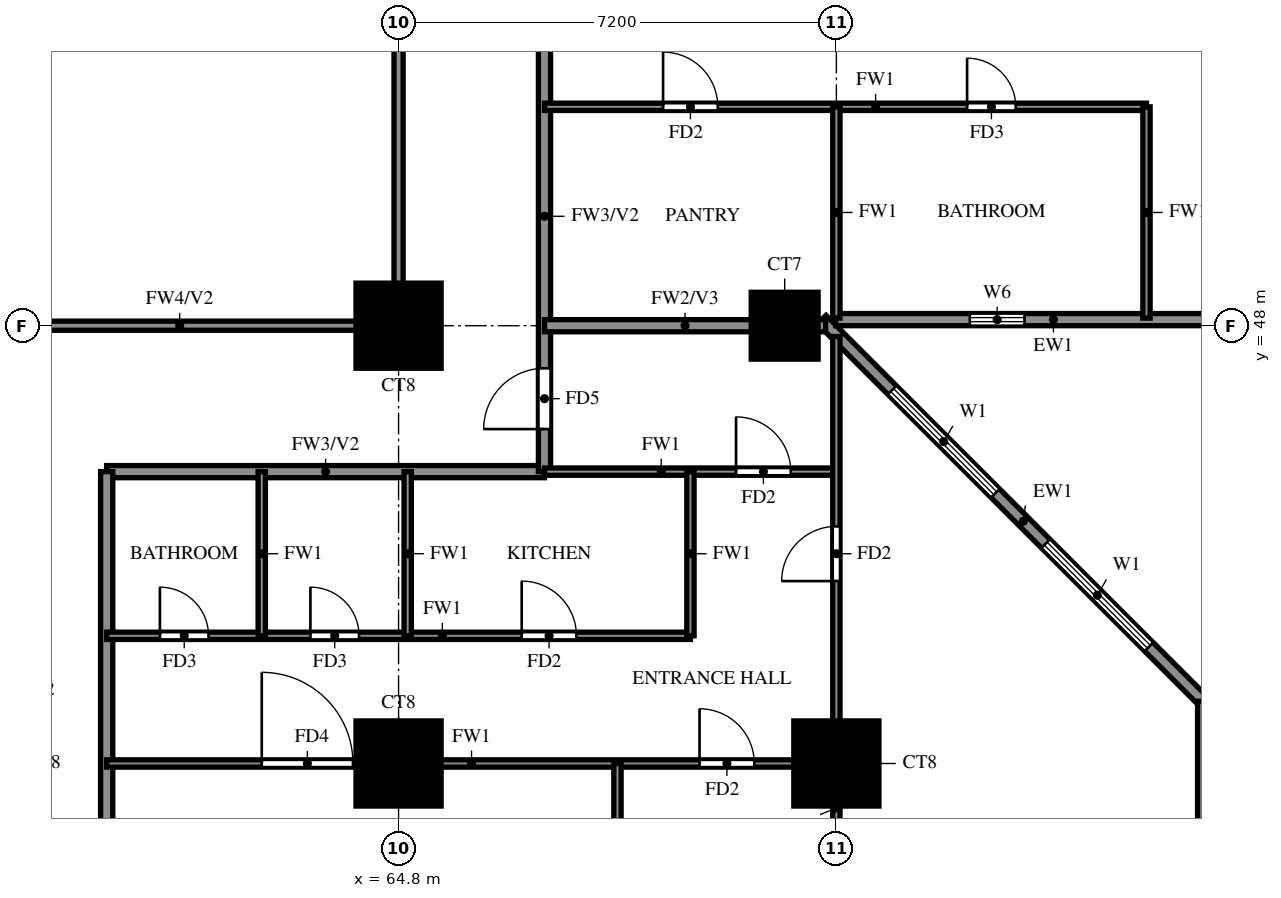
"""IFC4 building model, lengths in metres.
Left out: names, types, materials, properties, quantities, classifications, styles, units other than length and angle.
Written with IfcOpenShell. Run it as: python <this file> out.ifc"""

import sys

from ifc_helpers import new_model, si_unit, direction, frame, frame_2d, origin, origin_2d, place, context, subcontext, project, spatial, rectangle, extrude, source, transform, mapped, element, fill, save


model = new_model("IFC4")
c1 = context("Model", 3, precision=1e-05, world=origin(), true_north=direction((0.0, 1.0)))
c2 = subcontext(c1, "Body", "Model", "MODEL_VIEW")
j1 = project(units=[si_unit("LENGTHUNIT", "METRE"), si_unit("PLANEANGLEUNIT", "RADIAN")], contexts=[c1])
p1 = place(None, origin())
s1 = spatial("IfcSite", under=j1, at=p1, CompositionType="ELEMENT")
p2 = place(p1, origin())
s2 = spatial("IfcBuilding", under=s1, at=p2, CompositionType="ELEMENT")
p3 = place(p2, frame((0.0, 0.0, 58.5)))
s3 = spatial("IfcBuildingStorey", under=s2, at=p3, CompositionType="ELEMENT", Elevation=58.5)
m1 = source(origin(), c2, "Body", "SweptSolid", [
    extrude(rectangle(XDim=1.4, YDim=1.4, at=origin_2d()), origin(), (0.0, 0.0, 1.0), 3.18),
])
for number, where, z_axis, x_axis in (
    (1, (64.8, 40.8, 0.0), (0.0, 0.0, 1.0), (1.0, 0.0, 0.0)),
    (2, (72.0, 40.8, 0.0), (0.0, 0.0, 1.0), (1.0, 0.0, 0.0)),
    (3, (64.8, 48.0, 0.0), (0.0, 0.0, 1.0), (1.0, 0.0, 0.0)),
):
    element("IfcColumn", number, at=place(p3, frame(where, z_axis=z_axis, x_axis=x_axis)), inside=s3, PredefinedType="COLUMN", context=c2, shape_type="MappedRepresentation", body=[
        mapped(m1, transform((0.0, 0.0, 0.0))),
    ])
m2 = source(origin(), c2, "Body", "SweptSolid", [
    extrude(rectangle(XDim=1.1, YDim=1.1, at=origin_2d()), origin(), (0.0, 0.0, 1.0), 3.18),
])
p4 = place(p3, frame((71.15, 48.0, 0.0), z_axis=(0.0, 0.0, 1.0), x_axis=(1.0, 0.0, 0.0)))
e4 = element("IfcColumn", 4, at=p4, inside=s3, PredefinedType="COLUMN", context=c2, shape_type="MappedRepresentation", body=[
    mapped(m2, transform((0.0, 0.0, 0.0))),
])
p5 = place(p3, frame((78.74, 41.118, 0.0), z_axis=(0.0, 0.0, 1.0), x_axis=(-0.707106781187, 0.707106781187, 0.0)))
e5 = element("IfcWall", 5, at=p5, inside=s3, PredefinedType="SOLIDWALL", context=c2, shape_type="SweptSolid", body=[
    extrude(rectangle(XDim=9.874, YDim=0.2, at=frame_2d((4.937, 0.0))), origin(), (0.0, 0.0, 1.0), 3.18),
])
p6 = place(p5, frame((2.264, 0.0, 0.6)))
e6 = element("IfcOpeningElement", 6, at=p6, cuts=e5, PredefinedType="OPENING", context=c2, shape_type="SweptSolid", body=[
    extrude(rectangle(XDim=2.4, YDim=2.4, at=frame_2d((1.2, 1.2))), frame((0.0, 0.11, 0.0), z_axis=(0.0, -1.0, 0.0), x_axis=(1.0, 0.0, 0.0)), (0.0, 0.0, 1.0), 0.22),
])
p7 = place(p5, frame((5.836, 0.0, 0.6)))
e7 = element("IfcOpeningElement", 7, at=p7, cuts=e5, PredefinedType="OPENING", context=c2, shape_type="SweptSolid", body=[
    extrude(rectangle(XDim=2.4, YDim=2.4, at=frame_2d((1.2, 1.2))), frame((0.0, 0.11, 0.0), z_axis=(0.0, -1.0, 0.0), x_axis=(1.0, 0.0, 0.0)), (0.0, 0.0, 1.0), 0.22),
])
p8 = place(p3, frame((71.989, 48.1, 0.0), z_axis=(0.0, 0.0, 1.0), x_axis=(1.0, 0.0, 0.0)))
e8 = element("IfcWall", 8, at=p8, inside=s3, PredefinedType="SOLIDWALL", context=c2, shape_type="SweptSolid", body=[
    extrude(rectangle(XDim=6.511, YDim=0.2, at=frame_2d((3.256, 0.0))), origin(), (0.0, 0.0, 1.0), 3.18),
])
p9 = place(p8, frame((2.206, 0.0, 1.5)))
e9 = element("IfcOpeningElement", 9, at=p9, cuts=e8, PredefinedType="OPENING", context=c2, shape_type="SweptSolid", body=[
    extrude(rectangle(XDim=0.9, YDim=0.9, at=frame_2d((0.45, 0.45))), frame((0.0, 0.11, 0.0), z_axis=(0.0, -1.0, 0.0), x_axis=(1.0, 0.0, 0.0)), (0.0, 0.0, 1.0), 0.22),
])
p10 = place(p3, frame((60.0, 45.6, 0.0), z_axis=(0.0, 0.0, 1.0), x_axis=(1.0, 0.0, 0.0)))
e10 = element("IfcWall", 10, at=p10, inside=s3, PredefinedType="SOLIDWALL", context=c2, shape_type="SweptSolid", body=[
    extrude(rectangle(XDim=7.2, YDim=0.2, at=frame_2d((3.6, 0.0))), origin(), (0.0, 0.0, 1.0), 3.18),
])
p11 = place(p3, frame((60.0, 33.725, 0.0), z_axis=(0.0, 0.0, 1.0), x_axis=(0.0, 1.0, 0.0)))
e11 = element("IfcWall", 11, at=p11, inside=s3, PredefinedType="SOLIDWALL", context=c2, shape_type="SweptSolid", body=[
    extrude(rectangle(XDim=11.875, YDim=0.2, at=frame_2d((5.938, 0.0))), origin(), (0.0, 0.0, 1.0), 2.28),
])
p12 = place(p3, frame((67.2, 45.6, 0.0), z_axis=(0.0, 0.0, 1.0), x_axis=(0.0, 1.0, 0.0)))
e12 = element("IfcWall", 12, at=p12, inside=s3, PredefinedType="SOLIDWALL", context=c2, shape_type="SweptSolid", body=[
    extrude(rectangle(XDim=8.4, YDim=0.2, at=frame_2d((4.2, 0.0))), origin(), (0.0, 0.0, 1.0), 3.18),
])
p13 = place(p12, frame((0.7, 0.0, 0.0)))
e13 = element("IfcOpeningElement", 13, at=p13, cuts=e12, PredefinedType="OPENING", context=c2, shape_type="SweptSolid", body=[
    extrude(rectangle(XDim=1.0, YDim=2.1, at=frame_2d((0.5, 1.05))), frame((0.0, 0.11, 0.0), z_axis=(0.0, -1.0, 0.0), x_axis=(1.0, 0.0, 0.0)), (0.0, 0.0, 1.0), 0.22),
])
p14 = place(p3, frame((67.2, 48.0, 0.0), z_axis=(0.0, 0.0, 1.0), x_axis=(1.0, 0.0, 0.0)))
e14 = element("IfcWall", 14, at=p14, inside=s3, PredefinedType="SOLIDWALL", context=c2, shape_type="SweptSolid", body=[
    extrude(rectangle(XDim=4.623, YDim=0.2, at=frame_2d((2.312, 0.0))), origin(), (0.0, 0.0, 1.0), 3.18),
])
p15 = place(p3, frame((60.0, 40.8, 0.0), z_axis=(0.0, 0.0, 1.0), x_axis=(1.0, 0.0, 0.0)))
e15 = element("IfcWall", 15, at=p15, inside=s3, PredefinedType="PARTITIONING", context=c2, shape_type="SweptSolid", body=[
    extrude(rectangle(XDim=12.0, YDim=0.12, at=frame_2d((6.0, 0.0))), origin(), (0.0, 0.0, 1.0), 3.18),
])
p16 = place(p15, frame((9.75, 0.0, 0.0)))
e16 = element("IfcOpeningElement", 16, at=p16, cuts=e15, PredefinedType="OPENING", context=c2, shape_type="SweptSolid", body=[
    extrude(rectangle(XDim=0.9, YDim=2.1, at=frame_2d((0.45, 1.05))), frame((0.0, 0.07, 0.0), z_axis=(0.0, -1.0, 0.0), x_axis=(1.0, 0.0, 0.0)), (0.0, 0.0, 1.0), 0.14),
])
p17 = place(p15, frame((2.55, 0.0, 0.0)))
e17 = element("IfcOpeningElement", 17, at=p17, cuts=e15, PredefinedType="OPENING", context=c2, shape_type="SweptSolid", body=[
    extrude(rectangle(XDim=1.5, YDim=2.1, at=frame_2d((0.75, 1.05))), frame((0.0, 0.07, 0.0), z_axis=(0.0, -1.0, 0.0), x_axis=(1.0, 0.0, 0.0)), (0.0, 0.0, 1.0), 0.14),
])
p18 = place(p3, frame((60.0, 42.9, 0.0), z_axis=(0.0, 0.0, 1.0), x_axis=(1.0, 0.0, 0.0)))
e18 = element("IfcWall", 18, at=p18, inside=s3, PredefinedType="PARTITIONING", context=c2, shape_type="SweptSolid", body=[
    extrude(rectangle(XDim=9.6, YDim=0.12, at=frame_2d((4.8, 0.0))), origin(), (0.0, 0.0, 1.0), 3.18),
])
p19 = place(p18, frame((6.825, 0.0, 0.0)))
e19 = element("IfcOpeningElement", 19, at=p19, cuts=e18, PredefinedType="OPENING", context=c2, shape_type="SweptSolid", body=[
    extrude(rectangle(XDim=0.9, YDim=2.1, at=frame_2d((0.45, 1.05))), frame((0.0, 0.07, 0.0), z_axis=(0.0, -1.0, 0.0), x_axis=(1.0, 0.0, 0.0)), (0.0, 0.0, 1.0), 0.14),
])
p20 = place(p18, frame((3.35, 0.0, 0.0)))
e20 = element("IfcOpeningElement", 20, at=p20, cuts=e18, PredefinedType="OPENING", context=c2, shape_type="SweptSolid", body=[
    extrude(rectangle(XDim=0.8, YDim=2.1, at=frame_2d((0.4, 1.05))), frame((0.0, 0.07, 0.0), z_axis=(0.0, -1.0, 0.0), x_axis=(1.0, 0.0, 0.0)), (0.0, 0.0, 1.0), 0.14),
])
p21 = place(p18, frame((0.875, 0.0, 0.0)))
e21 = element("IfcOpeningElement", 21, at=p21, cuts=e18, PredefinedType="OPENING", context=c2, shape_type="SweptSolid", body=[
    extrude(rectangle(XDim=0.8, YDim=2.1, at=frame_2d((0.4, 1.05))), frame((0.0, 0.07, 0.0), z_axis=(0.0, -1.0, 0.0), x_axis=(1.0, 0.0, 0.0)), (0.0, 0.0, 1.0), 0.14),
])
p22 = place(p3, frame((67.2, 45.6, 0.0), z_axis=(0.0, 0.0, 1.0), x_axis=(1.0, 0.0, 0.0)))
e22 = element("IfcWall", 22, at=p22, inside=s3, PredefinedType="PARTITIONING", context=c2, shape_type="SweptSolid", body=[
    extrude(rectangle(XDim=4.8, YDim=0.12, at=frame_2d((2.4, 0.0))), origin(), (0.0, 0.0, 1.0), 3.18),
])
p23 = place(p22, frame((3.15, 0.0, 0.0)))
e23 = element("IfcOpeningElement", 23, at=p23, cuts=e22, PredefinedType="OPENING", context=c2, shape_type="SweptSolid", body=[
    extrude(rectangle(XDim=0.9, YDim=2.1, at=frame_2d((0.45, 1.05))), frame((0.0, 0.07, 0.0), z_axis=(0.0, -1.0, 0.0), x_axis=(1.0, 0.0, 0.0)), (0.0, 0.0, 1.0), 0.14),
])
p24 = place(p3, frame((67.2, 51.6, 0.0), z_axis=(0.0, 0.0, 1.0), x_axis=(1.0, 0.0, 0.0)))
e24 = element("IfcWall", 24, at=p24, inside=s3, PredefinedType="PARTITIONING", context=c2, shape_type="SweptSolid", body=[
    extrude(rectangle(XDim=9.9, YDim=0.12, at=frame_2d((4.95, 0.0))), origin(), (0.0, 0.0, 1.0), 3.18),
])
p25 = place(p24, frame((6.95, 0.0, 0.0)))
e25 = element("IfcOpeningElement", 25, at=p25, cuts=e24, PredefinedType="OPENING", context=c2, shape_type="SweptSolid", body=[
    extrude(rectangle(XDim=0.8, YDim=2.1, at=frame_2d((0.4, 1.05))), frame((0.0, 0.07, 0.0), z_axis=(0.0, -1.0, 0.0), x_axis=(1.0, 0.0, 0.0)), (0.0, 0.0, 1.0), 0.14),
])
p26 = place(p24, frame((1.95, 0.0, 0.0)))
e26 = element("IfcOpeningElement", 26, at=p26, cuts=e24, PredefinedType="OPENING", context=c2, shape_type="SweptSolid", body=[
    extrude(rectangle(XDim=0.9, YDim=2.1, at=frame_2d((0.45, 1.05))), frame((0.0, 0.07, 0.0), z_axis=(0.0, -1.0, 0.0), x_axis=(1.0, 0.0, 0.0)), (0.0, 0.0, 1.0), 0.14),
])
for number, where, z_axis, x_axis in (
    (27, (62.55, 42.9, 0.0), (0.0, 0.0, 1.0), (0.0, 1.0, 0.0)),
    (28, (64.95, 42.9, 0.0), (0.0, 0.0, 1.0), (0.0, 1.0, 0.0)),
):
    element("IfcWall", number, at=place(p3, frame(where, z_axis=z_axis, x_axis=x_axis)), inside=s3, PredefinedType="PARTITIONING", context=c2, shape_type="SweptSolid", body=[
        extrude(rectangle(XDim=2.7, YDim=0.12, at=frame_2d((1.35, 0.0))), origin(), (0.0, 0.0, 1.0), 3.18),
    ])
p27 = place(p3, frame((68.4, 33.725, 0.0), z_axis=(0.0, 0.0, 1.0), x_axis=(0.0, 1.0, 0.0)))
e29 = element("IfcWall", 29, at=p27, inside=s3, PredefinedType="PARTITIONING", context=c2, shape_type="SweptSolid", body=[
    extrude(rectangle(XDim=7.075, YDim=0.12, at=frame_2d((3.538, 0.0))), origin(), (0.0, 0.0, 1.0), 2.28),
])
p28 = place(p3, frame((69.6, 42.9, 0.0), z_axis=(0.0, 0.0, 1.0), x_axis=(0.0, 1.0, 0.0)))
e30 = element("IfcWall", 30, at=p28, inside=s3, PredefinedType="PARTITIONING", context=c2, shape_type="SweptSolid", body=[
    extrude(rectangle(XDim=2.7, YDim=0.12, at=frame_2d((1.35, 0.0))), origin(), (0.0, 0.0, 1.0), 3.18),
])
p29 = place(p3, frame((72.0, 33.725, 0.0), z_axis=(0.0, 0.0, 1.0), x_axis=(0.0, 1.0, 0.0)))
e31 = element("IfcWall", 31, at=p29, inside=s3, PredefinedType="PARTITIONING", context=c2, shape_type="SweptSolid", body=[
    extrude(rectangle(XDim=14.098, YDim=0.12, at=frame_2d((7.049, 0.0))), origin(), (0.0, 0.0, 1.0), 2.28),
])
p30 = place(p29, frame((10.075, 0.0, 0.0)))
e32 = element("IfcOpeningElement", 32, at=p30, cuts=e31, PredefinedType="OPENING", context=c2, shape_type="SweptSolid", body=[
    extrude(rectangle(XDim=0.9, YDim=2.1, at=frame_2d((0.45, 1.05))), frame((0.0, 0.07, 0.0), z_axis=(0.0, -1.0, 0.0), x_axis=(1.0, 0.0, 0.0)), (0.0, 0.0, 1.0), 0.14),
])
for number, where, z_axis, x_axis in (
    (33, (72.0, 48.125, 0.0), (0.0, 0.0, 1.0), (0.0, 1.0, 0.0)),
    (34, (77.1, 48.125, 0.0), (0.0, 0.0, 1.0), (0.0, 1.0, 0.0)),
):
    element("IfcWall", number, at=place(p3, frame(where, z_axis=z_axis, x_axis=x_axis)), inside=s3, PredefinedType="PARTITIONING", context=c2, shape_type="SweptSolid", body=[
        extrude(rectangle(XDim=3.475, YDim=0.12, at=frame_2d((1.738, 0.0))), origin(), (0.0, 0.0, 1.0), 3.18),
    ])
p31 = place(p3, frame((78.0, 33.725, 0.0), z_axis=(0.0, 0.0, 1.0), x_axis=(0.0, 1.0, 0.0)))
e35 = element("IfcWall", 35, at=p31, inside=s3, PredefinedType="PARTITIONING", context=c2, shape_type="SweptSolid", body=[
    extrude(rectangle(XDim=8.098, YDim=0.12, at=frame_2d((4.049, 0.0))), origin(), (0.0, 0.0, 1.0), 2.28),
])
p32 = place(p31, frame((3.599, 0.0, 0.0)))
e36 = element("IfcOpeningElement", 36, at=p32, cuts=e35, PredefinedType="OPENING", context=c2, shape_type="SweptSolid", body=[
    extrude(rectangle(XDim=0.9, YDim=2.1, at=frame_2d((0.45, 1.05))), frame((0.0, 0.07, 0.0), z_axis=(0.0, -1.0, 0.0), x_axis=(1.0, 0.0, 0.0)), (0.0, 0.0, 1.0), 0.14),
])
p33 = place(p3, frame((57.6, 48.0, 0.0), z_axis=(0.0, 0.0, 1.0), x_axis=(1.0, 0.0, 0.0)))
e37 = element("IfcWall", 37, at=p33, inside=s3, PredefinedType="SOLIDWALL", context=c2, shape_type="SweptSolid", body=[
    extrude(rectangle(XDim=7.2, YDim=0.15, at=frame_2d((3.6, 0.0))), origin(), (0.0, 0.0, 1.0), 2.28),
])
p34 = place(p3, frame((64.8, 48.0, 0.0), z_axis=(0.0, 0.0, 1.0), x_axis=(0.0, 1.0, 0.0)))
e38 = element("IfcWall", 38, at=p34, inside=s3, PredefinedType="SOLIDWALL", context=c2, shape_type="SweptSolid", body=[
    extrude(rectangle(XDim=14.4, YDim=0.15, at=frame_2d((7.2, 0.0))), origin(), (0.0, 0.0, 1.0), 2.28),
])
p35 = place(p6, origin())
e39 = element("IfcWindow", 39, at=p35, inside=s3, PartitioningType="DOUBLE_PANEL_VERTICAL", PredefinedType="WINDOW", context=c2, shape_type="SweptSolid", body=[
    extrude(rectangle(XDim=2.4, YDim=2.4, at=frame_2d((1.2, 1.2))), frame((0.0, 0.03, 0.0), z_axis=(0.0, -1.0, 0.0), x_axis=(1.0, 0.0, 0.0)), (0.0, 0.0, 1.0), 0.06),
])
fill(e6, e39)
p36 = place(p7, origin())
e40 = element("IfcWindow", 40, at=p36, inside=s3, PartitioningType="DOUBLE_PANEL_VERTICAL", PredefinedType="WINDOW", context=c2, shape_type="SweptSolid", body=[
    extrude(rectangle(XDim=2.4, YDim=2.4, at=frame_2d((1.2, 1.2))), frame((0.0, 0.03, 0.0), z_axis=(0.0, -1.0, 0.0), x_axis=(1.0, 0.0, 0.0)), (0.0, 0.0, 1.0), 0.06),
])
fill(e7, e40)
p37 = place(p9, origin())
e41 = element("IfcWindow", 41, at=p37, inside=s3, PartitioningType="SINGLE_PANEL", PredefinedType="WINDOW", context=c2, shape_type="SweptSolid", body=[
    extrude(rectangle(XDim=0.9, YDim=0.9, at=frame_2d((0.45, 0.45))), frame((0.0, 0.03, 0.0), z_axis=(0.0, -1.0, 0.0), x_axis=(1.0, 0.0, 0.0)), (0.0, 0.0, 1.0), 0.06),
])
fill(e9, e41)
p38 = place(p25, origin())
e42 = element("IfcDoor", 42, at=p38, inside=s3, OperationType="SINGLE_SWING_LEFT", PredefinedType="DOOR", context=c2, shape_type="SweptSolid", body=[
    extrude(rectangle(XDim=0.8, YDim=2.1, at=frame_2d((0.4, 1.05))), frame((0.0, 0.025, 0.0), z_axis=(0.0, -1.0, 0.0), x_axis=(1.0, 0.0, 0.0)), (0.0, 0.0, 1.0), 0.05),
])
fill(e25, e42)
p39 = place(p26, origin())
e43 = element("IfcDoor", 43, at=p39, inside=s3, OperationType="SINGLE_SWING_LEFT", PredefinedType="DOOR", context=c2, shape_type="SweptSolid", body=[
    extrude(rectangle(XDim=0.9, YDim=2.1, at=frame_2d((0.45, 1.05))), frame((0.0, 0.025, 0.0), z_axis=(0.0, -1.0, 0.0), x_axis=(1.0, 0.0, 0.0)), (0.0, 0.0, 1.0), 0.05),
])
fill(e26, e43)
p40 = place(p23, origin())
e44 = element("IfcDoor", 44, at=p40, inside=s3, OperationType="SINGLE_SWING_RIGHT", PredefinedType="DOOR", context=c2, shape_type="SweptSolid", body=[
    extrude(rectangle(XDim=0.9, YDim=2.1, at=frame_2d((0.45, 1.05))), frame((0.0, 0.025, 0.0), z_axis=(0.0, -1.0, 0.0), x_axis=(1.0, 0.0, 0.0)), (0.0, 0.0, 1.0), 0.05),
])
fill(e23, e44)
p41 = place(p13, origin())
e45 = element("IfcDoor", 45, at=p41, inside=s3, OperationType="SINGLE_SWING_LEFT", PredefinedType="DOOR", context=c2, shape_type="SweptSolid", body=[
    extrude(rectangle(XDim=1.0, YDim=2.1, at=frame_2d((0.5, 1.05))), frame((0.0, 0.025, 0.0), z_axis=(0.0, -1.0, 0.0), x_axis=(1.0, 0.0, 0.0)), (0.0, 0.0, 1.0), 0.05),
])
fill(e13, e45)
p42 = place(p16, origin())
e46 = element("IfcDoor", 46, at=p42, inside=s3, OperationType="SINGLE_SWING_LEFT", PredefinedType="DOOR", context=c2, shape_type="SweptSolid", body=[
    extrude(rectangle(XDim=0.9, YDim=2.1, at=frame_2d((0.45, 1.05))), frame((0.0, 0.025, 0.0), z_axis=(0.0, -1.0, 0.0), x_axis=(1.0, 0.0, 0.0)), (0.0, 0.0, 1.0), 0.05),
])
fill(e16, e46)
p43 = place(p17, origin())
e47 = element("IfcDoor", 47, at=p43, inside=s3, OperationType="SINGLE_SWING_LEFT", PredefinedType="DOOR", context=c2, shape_type="SweptSolid", body=[
    extrude(rectangle(XDim=1.5, YDim=2.1, at=frame_2d((0.75, 1.05))), frame((0.0, 0.025, 0.0), z_axis=(0.0, -1.0, 0.0), x_axis=(1.0, 0.0, 0.0)), (0.0, 0.0, 1.0), 0.05),
])
fill(e17, e47)
p44 = place(p19, origin())
e48 = element("IfcDoor", 48, at=p44, inside=s3, OperationType="SINGLE_SWING_LEFT", PredefinedType="DOOR", context=c2, shape_type="SweptSolid", body=[
    extrude(rectangle(XDim=0.9, YDim=2.1, at=frame_2d((0.45, 1.05))), frame((0.0, 0.025, 0.0), z_axis=(0.0, -1.0, 0.0), x_axis=(1.0, 0.0, 0.0)), (0.0, 0.0, 1.0), 0.05),
])
fill(e19, e48)
p45 = place(p20, origin())
e49 = element("IfcDoor", 49, at=p45, inside=s3, OperationType="SINGLE_SWING_LEFT", PredefinedType="DOOR", context=c2, shape_type="SweptSolid", body=[
    extrude(rectangle(XDim=0.8, YDim=2.1, at=frame_2d((0.4, 1.05))), frame((0.0, 0.025, 0.0), z_axis=(0.0, -1.0, 0.0), x_axis=(1.0, 0.0, 0.0)), (0.0, 0.0, 1.0), 0.05),
])
fill(e20, e49)
p46 = place(p21, origin())
e50 = element("IfcDoor", 50, at=p46, inside=s3, OperationType="SINGLE_SWING_RIGHT", PredefinedType="DOOR", context=c2, shape_type="SweptSolid", body=[
    extrude(rectangle(XDim=0.8, YDim=2.1, at=frame_2d((0.4, 1.05))), frame((0.0, 0.025, 0.0), z_axis=(0.0, -1.0, 0.0), x_axis=(1.0, 0.0, 0.0)), (0.0, 0.0, 1.0), 0.05),
])
fill(e21, e50)
p47 = place(p30, origin())
e51 = element("IfcDoor", 51, at=p47, inside=s3, OperationType="SINGLE_SWING_LEFT", PredefinedType="DOOR", context=c2, shape_type="SweptSolid", body=[
    extrude(rectangle(XDim=0.9, YDim=2.1, at=frame_2d((0.45, 1.05))), frame((0.0, 0.025, 0.0), z_axis=(0.0, -1.0, 0.0), x_axis=(1.0, 0.0, 0.0)), (0.0, 0.0, 1.0), 0.05),
])
fill(e32, e51)
save(model, sys.argv[1])
